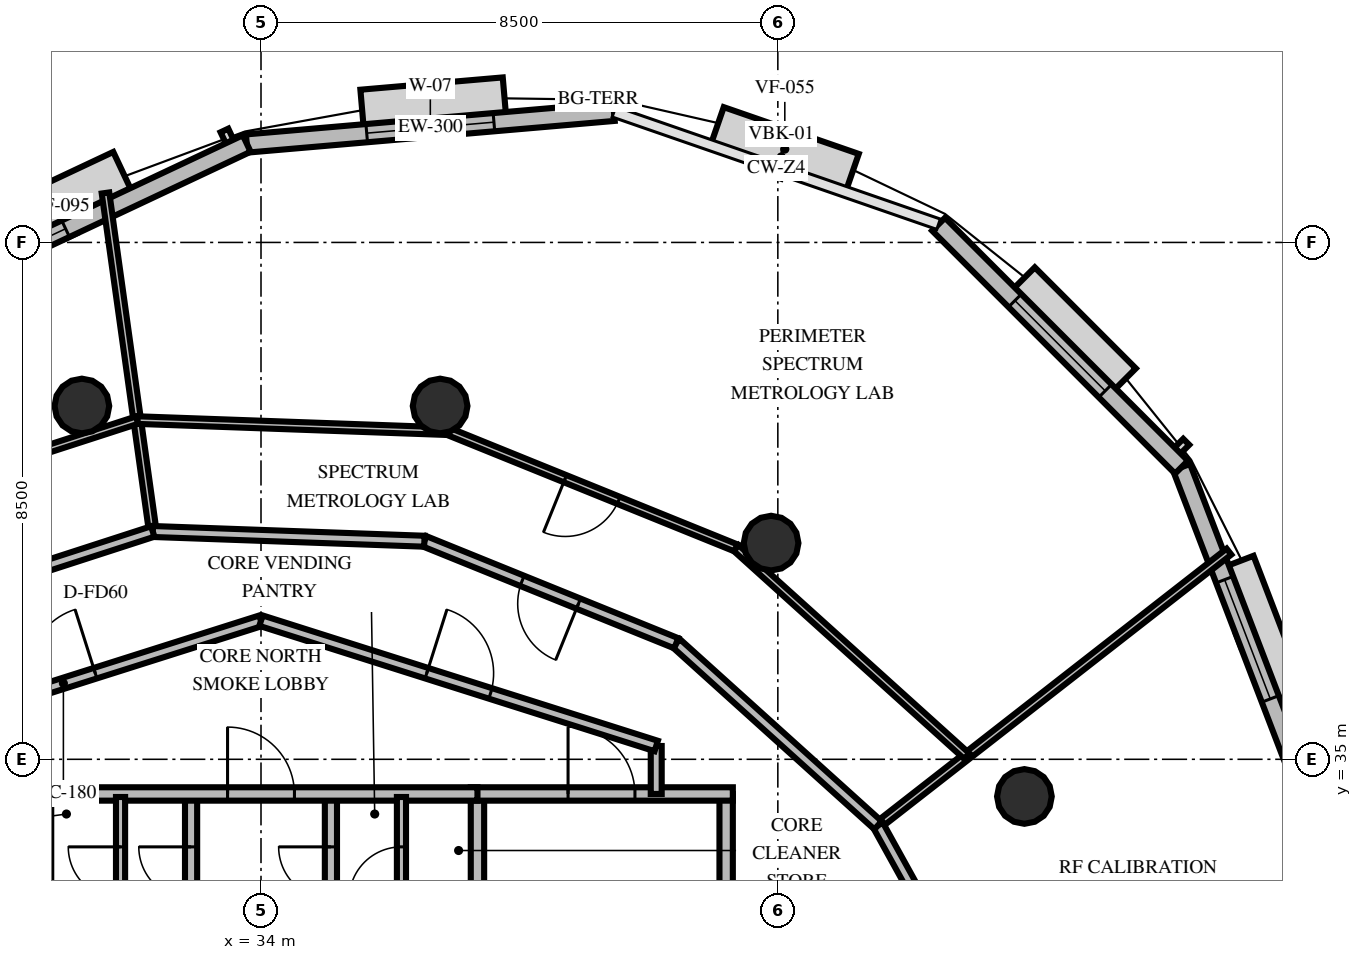
"""IFC4 building model, lengths in metres.
Left out: names, types, materials, properties, quantities, classifications, styles, units other than length and angle.
Written with IfcOpenShell. Run it as: python <this file> out.ifc"""

import sys

from ifc_helpers import new_model, si_unit, direction, frame, frame_2d, origin, origin_2d, place, context, subcontext, project, spatial, rectangle, circle, extrude, element, fill, save


model = new_model("IFC4")
c1 = context("Model", 3, precision=1e-05, world=origin(), true_north=direction((0.0, 1.0)))
c2 = subcontext(c1, "Body", "Model", "MODEL_VIEW")
j1 = project(units=[si_unit("LENGTHUNIT", "METRE"), si_unit("PLANEANGLEUNIT", "RADIAN")], contexts=[c1])
p1 = place(None, origin())
s1 = spatial("IfcSite", under=j1, at=p1, CompositionType="ELEMENT")
p2 = place(p1, origin())
s2 = spatial("IfcBuilding", under=s1, at=p2, CompositionType="ELEMENT")
p3 = place(p2, frame((0.0, 0.0, 270.0)))
s3 = spatial("IfcBuildingStorey", under=s2, at=p3, CompositionType="ELEMENT", Elevation=270.0)
for number, where, z_axis, x_axis in (
    (1, (46.555, 34.389, 0.0), (0.0, 0.0, 1.0), (1.0, 0.0, 0.0)),
    (2, (42.389, 38.555, 0.0), (0.0, 0.0, 1.0), (1.0, 0.0, 0.0)),
    (3, (36.946, 40.81, 0.0), (0.0, 0.0, 1.0), (1.0, 0.0, 0.0)),
    (4, (31.054, 40.81, 0.0), (0.0, 0.0, 1.0), (1.0, 0.0, 0.0)),
):
    element("IfcColumn", number, at=place(p3, frame(where, z_axis=z_axis, x_axis=x_axis)), inside=s3, PredefinedType="COLUMN", context=c2, shape_type="SweptSolid", body=[
        extrude(circle(Radius=0.45, at=origin_2d()), origin(), (0.0, 0.0, 1.0), 3.6),
    ])
p4 = place(p3, frame((39.804, 45.648, 0.0), z_axis=(0.0, 0.0, 1.0), x_axis=(-0.996296147919, -0.08598828782, 0.0)))
e5 = element("IfcWall", 5, at=p4, inside=s3, PredefinedType="SOLIDWALL", context=c2, shape_type="SweptSolid", body=[
    extrude(rectangle(XDim=6.062, YDim=0.3, at=frame_2d((3.031, 0.0))), origin(), (0.0, 0.0, 1.0), 2.76),
])
p5 = place(p4, frame((1.981, 0.0, 0.8)))
e6 = element("IfcOpeningElement", 6, at=p5, cuts=e5, PredefinedType="OPENING", context=c2, shape_type="SweptSolid", body=[
    extrude(rectangle(XDim=2.1, YDim=1.85, at=frame_2d((1.05, 0.925))), frame((0.0, 0.16, 0.0), z_axis=(0.0, -1.0, 0.0), x_axis=(1.0, 0.0, 0.0)), (0.0, 0.0, 1.0), 0.32),
])
p6 = place(p3, frame((33.765, 45.127, 0.0), z_axis=(0.0, 0.0, 1.0), x_axis=(-0.904858675558, -0.425712082595, 0.0)))
e7 = element("IfcWall", 7, at=p6, inside=s3, PredefinedType="SOLIDWALL", context=c2, shape_type="SweptSolid", body=[
    extrude(rectangle(XDim=6.643, YDim=0.3, at=frame_2d((3.322, 0.0))), origin(), (0.0, 0.0, 1.0), 2.76),
])
p7 = place(p6, frame((3.292, 0.0, 0.8)))
e8 = element("IfcOpeningElement", 8, at=p7, cuts=e7, PredefinedType="OPENING", context=c2, shape_type="SweptSolid", body=[
    extrude(rectangle(XDim=2.1, YDim=1.85, at=frame_2d((1.05, 0.925))), frame((0.0, 0.16, 0.0), z_axis=(0.0, -1.0, 0.0), x_axis=(1.0, 0.0, 0.0)), (0.0, 0.0, 1.0), 0.32),
])
p8 = place(p3, frame((51.308, 34.143, 0.0), z_axis=(0.0, 0.0, 1.0), x_axis=(-0.357845295603, 0.933780886726, 0.0)))
e9 = element("IfcWall", 9, at=p8, inside=s3, PredefinedType="SOLIDWALL", context=c2, shape_type="SweptSolid", body=[
    extrude(rectangle(XDim=6.062, YDim=0.3, at=frame_2d((3.031, 0.0))), origin(), (0.0, 0.0, 1.0), 2.76),
])
p9 = place(p8, frame((1.981, 0.0, 0.8)))
e10 = element("IfcOpeningElement", 10, at=p9, cuts=e9, PredefinedType="OPENING", context=c2, shape_type="SweptSolid", body=[
    extrude(rectangle(XDim=2.1, YDim=1.85, at=frame_2d((1.05, 0.925))), frame((0.0, 0.16, 0.0), z_axis=(0.0, -1.0, 0.0), x_axis=(1.0, 0.0, 0.0)), (0.0, 0.0, 1.0), 0.32),
])
p10 = place(p3, frame((49.139, 39.804, 0.0), z_axis=(0.0, 0.0, 1.0), x_axis=(-0.707063571386, 0.707149988347, 0.0)))
e11 = element("IfcWall", 11, at=p10, inside=s3, PredefinedType="SOLIDWALL", context=c2, shape_type="SweptSolid", body=[
    extrude(rectangle(XDim=5.65, YDim=0.3, at=frame_2d((2.825, 0.0))), origin(), (0.0, 0.0, 1.0), 2.76),
])
p11 = place(p10, frame((1.775, 0.0, 0.8)))
e12 = element("IfcOpeningElement", 12, at=p11, cuts=e11, PredefinedType="OPENING", context=c2, shape_type="SweptSolid", body=[
    extrude(rectangle(XDim=2.1, YDim=1.85, at=frame_2d((1.05, 0.925))), frame((0.0, 0.16, 0.0), z_axis=(0.0, -1.0, 0.0), x_axis=(1.0, 0.0, 0.0)), (0.0, 0.0, 1.0), 0.32),
])
p12 = place(p3, frame((32.85, 30.05, 0.0), z_axis=(0.0, 0.0, 1.0), x_axis=(0.0, 1.0, 0.0)))
e13 = element("IfcWall", 13, at=p12, inside=s3, PredefinedType="SOLIDWALL", context=c2, shape_type="SweptSolid", body=[
    extrude(rectangle(XDim=4.38, YDim=0.2, at=frame_2d((2.19, 0.0))), origin(), (0.0, 0.0, 1.0), 2.46),
])
p13 = place(p12, frame((2.65, 0.0, 0.0)))
e14 = element("IfcOpeningElement", 14, at=p13, cuts=e13, PredefinedType="OPENING", context=c2, shape_type="SweptSolid", body=[
    extrude(rectangle(XDim=0.86, YDim=2.05, at=frame_2d((0.43, 1.025))), frame((0.0, 0.11, 0.0), z_axis=(0.0, -1.0, 0.0), x_axis=(1.0, 0.0, 0.0)), (0.0, 0.0, 1.0), 0.22),
])
p14 = place(p3, frame((37.56, 30.05, 0.0), z_axis=(0.0, 0.0, 1.0), x_axis=(0.0, 1.0, 0.0)))
e15 = element("IfcWall", 15, at=p14, inside=s3, PredefinedType="SOLIDWALL", context=c2, shape_type="SweptSolid", body=[
    extrude(rectangle(XDim=4.38, YDim=0.22, at=frame_2d((2.19, 0.0))), origin(), (0.0, 0.0, 1.0), 2.46),
])
p15 = place(p14, frame((0.8, 0.0, 0.0)))
e16 = element("IfcOpeningElement", 16, at=p15, cuts=e15, PredefinedType="OPENING", context=c2, shape_type="SweptSolid", body=[
    extrude(rectangle(XDim=1.05, YDim=2.1, at=frame_2d((0.525, 1.05))), frame((0.0, 0.12, 0.0), z_axis=(0.0, -1.0, 0.0), x_axis=(1.0, 0.0, 0.0)), (0.0, 0.0, 1.0), 0.24),
])
p16 = place(p3, frame((41.65, 30.05, 0.0), z_axis=(0.0, 0.0, 1.0), x_axis=(0.0, 1.0, 0.0)))
e17 = element("IfcWall", 17, at=p16, inside=s3, PredefinedType="SOLIDWALL", context=c2, shape_type="SweptSolid", body=[
    extrude(rectangle(XDim=4.38, YDim=0.22, at=frame_2d((2.19, 0.0))), origin(), (0.0, 0.0, 1.0), 2.46),
])
p17 = place(p3, frame((37.45, 34.43, 0.0), z_axis=(0.0, 0.0, 1.0), x_axis=(1.0, 0.0, 0.0)))
e18 = element("IfcWall", 18, at=p17, inside=s3, PredefinedType="SOLIDWALL", context=c2, shape_type="SweptSolid", body=[
    extrude(rectangle(XDim=4.31, YDim=0.22, at=frame_2d((2.155, 0.0))), origin(), (0.0, 0.0, 1.0), 2.46),
])
p18 = place(p17, frame((1.6, 0.0, 0.0)))
e19 = element("IfcOpeningElement", 19, at=p18, cuts=e18, PredefinedType="OPENING", context=c2, shape_type="SweptSolid", body=[
    extrude(rectangle(XDim=1.1, YDim=2.15, at=frame_2d((0.55, 1.075))), frame((0.0, 0.12, 0.0), z_axis=(0.0, -1.0, 0.0), x_axis=(1.0, 0.0, 0.0)), (0.0, 0.0, 1.0), 0.24),
])
p19 = place(p3, frame((35.15, 30.05, 0.0), z_axis=(0.0, 0.0, 1.0), x_axis=(0.0, 1.0, 0.0)))
e20 = element("IfcWall", 20, at=p19, inside=s3, PredefinedType="SOLIDWALL", context=c2, shape_type="SweptSolid", body=[
    extrude(rectangle(XDim=4.38, YDim=0.2, at=frame_2d((2.19, 0.0))), origin(), (0.0, 0.0, 1.0), 2.46),
])
p20 = place(p19, frame((2.65, 0.0, 0.0)))
e21 = element("IfcOpeningElement", 21, at=p20, cuts=e20, PredefinedType="OPENING", context=c2, shape_type="SweptSolid", body=[
    extrude(rectangle(XDim=0.86, YDim=2.05, at=frame_2d((0.43, 1.025))), frame((0.0, 0.11, 0.0), z_axis=(0.0, -1.0, 0.0), x_axis=(1.0, 0.0, 0.0)), (0.0, 0.0, 1.0), 0.22),
])
p21 = place(p3, frame((30.44, 34.43, 0.0), z_axis=(0.0, 0.0, 1.0), x_axis=(1.0, 0.0, 0.0)))
e22 = element("IfcWall", 22, at=p21, inside=s3, PredefinedType="SOLIDWALL", context=c2, shape_type="SweptSolid", body=[
    extrude(rectangle(XDim=7.12, YDim=0.22, at=frame_2d((3.56, 0.0))), origin(), (0.0, 0.0, 1.0), 2.46),
])
p22 = place(p21, frame((3.01, 0.0, 0.0)))
e23 = element("IfcOpeningElement", 23, at=p22, cuts=e22, PredefinedType="OPENING", context=c2, shape_type="SweptSolid", body=[
    extrude(rectangle(XDim=1.1, YDim=2.15, at=frame_2d((0.55, 1.075))), frame((0.0, 0.12, 0.0), z_axis=(0.0, -1.0, 0.0), x_axis=(1.0, 0.0, 0.0)), (0.0, 0.0, 1.0), 0.24),
])
p23 = place(p3, frame((31.69, 32.05, 0.0), z_axis=(0.0, 0.0, 1.0), x_axis=(0.0, 1.0, 0.0)))
e24 = element("IfcWall", 24, at=p23, inside=s3, PredefinedType="PARTITIONING", context=c2, shape_type="SweptSolid", body=[
    extrude(rectangle(XDim=2.33, YDim=0.15, at=frame_2d((1.165, 0.0))), origin(), (0.0, 0.0, 1.0), 2.46),
])
p24 = place(p23, frame((0.65, 0.0, 0.0)))
e25 = element("IfcOpeningElement", 25, at=p24, cuts=e24, PredefinedType="OPENING", context=c2, shape_type="SweptSolid", body=[
    extrude(rectangle(XDim=0.86, YDim=2.05, at=frame_2d((0.43, 1.025))), frame((0.0, 0.085, 0.0), z_axis=(0.0, -1.0, 0.0), x_axis=(1.0, 0.0, 0.0)), (0.0, 0.0, 1.0), 0.17),
])
p25 = place(p3, frame((36.31, 32.05, 0.0), z_axis=(0.0, 0.0, 1.0), x_axis=(0.0, 1.0, 0.0)))
e26 = element("IfcWall", 26, at=p25, inside=s3, PredefinedType="PARTITIONING", context=c2, shape_type="SweptSolid", body=[
    extrude(rectangle(XDim=2.33, YDim=0.15, at=frame_2d((1.165, 0.0))), origin(), (0.0, 0.0, 1.0), 2.46),
])
p26 = place(p25, frame((0.65, 0.0, 0.0)))
e27 = element("IfcOpeningElement", 27, at=p26, cuts=e26, PredefinedType="OPENING", context=c2, shape_type="SweptSolid", body=[
    extrude(rectangle(XDim=0.86, YDim=2.05, at=frame_2d((0.43, 1.025))), frame((0.0, 0.085, 0.0), z_axis=(0.0, -1.0, 0.0), x_axis=(1.0, 0.0, 0.0)), (0.0, 0.0, 1.0), 0.17),
])
p27 = place(p3, frame((40.5, 35.219, 0.0), z_axis=(0.0, 0.0, 1.0), x_axis=(0.0, -1.0, 0.0)))
e28 = element("IfcWall", 28, at=p27, inside=s3, PredefinedType="PARTITIONING", context=c2, shape_type="SweptSolid", body=[
    extrude(rectangle(XDim=0.789, YDim=0.18, at=frame_2d((0.395, 0.0))), origin(), (0.0, 0.0, 1.0), 2.46),
])
p28 = place(p3, frame((27.5, 35.219, 0.0), z_axis=(0.0, 0.0, 1.0), x_axis=(0.953228121756, 0.302251795518, 0.0)))
e29 = element("IfcWall", 29, at=p28, inside=s3, PredefinedType="PARTITIONING", context=c2, shape_type="SweptSolid", body=[
    extrude(rectangle(XDim=6.819, YDim=0.18, at=frame_2d((3.409, 0.0))), origin(), (0.0, 0.0, 1.0), 2.46),
])
p29 = place(p28, frame((2.86, 0.0, 0.0)))
e30 = element("IfcOpeningElement", 30, at=p29, cuts=e29, PredefinedType="OPENING", context=c2, shape_type="SweptSolid", body=[
    extrude(rectangle(XDim=1.1, YDim=2.15, at=frame_2d((0.55, 1.075))), frame((0.0, 0.1, 0.0), z_axis=(0.0, -1.0, 0.0), x_axis=(1.0, 0.0, 0.0)), (0.0, 0.0, 1.0), 0.2),
])
p30 = place(p3, frame((34.0, 37.28, 0.0), z_axis=(0.0, 0.0, 1.0), x_axis=(0.953228121756, -0.302251795518, 0.0)))
e31 = element("IfcWall", 31, at=p30, inside=s3, PredefinedType="PARTITIONING", context=c2, shape_type="SweptSolid", body=[
    extrude(rectangle(XDim=6.819, YDim=0.18, at=frame_2d((3.409, 0.0))), origin(), (0.0, 0.0, 1.0), 2.46),
])
p31 = place(p30, frame((2.86, 0.0, 0.0)))
e32 = element("IfcOpeningElement", 32, at=p31, cuts=e31, PredefinedType="OPENING", context=c2, shape_type="SweptSolid", body=[
    extrude(rectangle(XDim=1.1, YDim=2.15, at=frame_2d((0.55, 1.075))), frame((0.0, 0.1, 0.0), z_axis=(0.0, -1.0, 0.0), x_axis=(1.0, 0.0, 0.0)), (0.0, 0.0, 1.0), 0.2),
])
p32 = place(p3, frame((44.149, 33.915, 0.0), z_axis=(0.0, 0.0, 1.0), x_axis=(0.788548574124, 0.614972476008, 0.0)))
e33 = element("IfcWall", 33, at=p32, inside=s3, PredefinedType="PARTITIONING", context=c2, shape_type="SweptSolid", body=[
    extrude(rectangle(XDim=7.318, YDim=0.125, at=frame_2d((3.659, 0.0))), origin(), (0.0, 0.0, 1.0), 2.46),
])
p33 = place(p3, frame((46.098, 30.391, 0.0), z_axis=(0.0, 0.0, 1.0), x_axis=(-0.484005083868, 0.875065185452, 0.0)))
e34 = element("IfcWall", 34, at=p33, inside=s3, PredefinedType="PARTITIONING", context=c2, shape_type="SweptSolid", body=[
    extrude(rectangle(XDim=4.027, YDim=0.18, at=frame_2d((2.013, 0.0))), origin(), (0.0, 0.0, 1.0), 2.46),
])
p34 = place(p33, frame((0.832, 0.0, 0.0)))
e35 = element("IfcOpeningElement", 35, at=p34, cuts=e34, PredefinedType="OPENING", context=c2, shape_type="SweptSolid", body=[
    extrude(rectangle(XDim=1.0, YDim=2.15, at=frame_2d((0.5, 1.075))), frame((0.0, 0.1, 0.0), z_axis=(0.0, -1.0, 0.0), x_axis=(1.0, 0.0, 0.0)), (0.0, 0.0, 1.0), 0.2),
])
p35 = place(p3, frame((32.22, 38.746, 0.0), z_axis=(0.0, 0.0, 1.0), x_axis=(-0.138331765083, 0.990385946371, 0.0)))
e36 = element("IfcWall", 36, at=p35, inside=s3, PredefinedType="PARTITIONING", context=c2, shape_type="SweptSolid", body=[
    extrude(rectangle(XDim=5.621, YDim=0.125, at=frame_2d((2.811, 0.0))), origin(), (0.0, 0.0, 1.0), 2.46),
])
p36 = place(p3, frame((44.149, 33.915, 0.0), z_axis=(0.0, 0.0, 1.0), x_axis=(-0.742573984857, 0.669764045775, 0.0)))
e37 = element("IfcWall", 37, at=p36, inside=s3, PredefinedType="PARTITIONING", context=c2, shape_type="SweptSolid", body=[
    extrude(rectangle(XDim=4.47, YDim=0.18, at=frame_2d((2.235, 0.0))), origin(), (0.0, 0.0, 1.0), 2.46),
])
p37 = place(p3, frame((40.83, 36.908, 0.0), z_axis=(0.0, 0.0, 1.0), x_axis=(-0.926859496036, 0.375408410411, 0.0)))
e38 = element("IfcWall", 38, at=p37, inside=s3, PredefinedType="PARTITIONING", context=c2, shape_type="SweptSolid", body=[
    extrude(rectangle(XDim=4.47, YDim=0.18, at=frame_2d((2.235, 0.0))), origin(), (0.0, 0.0, 1.0), 2.46),
])
p38 = place(p37, frame((1.735, 0.0, 0.0)))
e39 = element("IfcOpeningElement", 39, at=p38, cuts=e38, PredefinedType="OPENING", context=c2, shape_type="SweptSolid", body=[
    extrude(rectangle(XDim=1.0, YDim=2.15, at=frame_2d((0.5, 1.075))), frame((0.0, 0.1, 0.0), z_axis=(0.0, -1.0, 0.0), x_axis=(1.0, 0.0, 0.0)), (0.0, 0.0, 1.0), 0.2),
])
p39 = place(p3, frame((36.687, 38.586, 0.0), z_axis=(0.0, 0.0, 1.0), x_axis=(-0.999359789069, 0.035777255238, 0.0)))
e40 = element("IfcWall", 40, at=p39, inside=s3, PredefinedType="PARTITIONING", context=c2, shape_type="SweptSolid", body=[
    extrude(rectangle(XDim=4.47, YDim=0.18, at=frame_2d((2.235, 0.0))), origin(), (0.0, 0.0, 1.0), 2.46),
])
p40 = place(p3, frame((45.607, 35.052, 0.0), z_axis=(0.0, 0.0, 1.0), x_axis=(-0.742559943457, 0.669779613286, 0.0)))
e41 = element("IfcWall", 41, at=p40, inside=s3, PredefinedType="PARTITIONING", context=c2, shape_type="SweptSolid", body=[
    extrude(rectangle(XDim=5.112, YDim=0.125, at=frame_2d((2.556, 0.0))), origin(), (0.0, 0.0, 1.0), 2.46),
])
p41 = place(p3, frame((41.811, 38.477, 0.0), z_axis=(0.0, 0.0, 1.0), x_axis=(-0.926857415115, 0.375413548033, 0.0)))
e42 = element("IfcWall", 42, at=p41, inside=s3, PredefinedType="PARTITIONING", context=c2, shape_type="SweptSolid", body=[
    extrude(rectangle(XDim=5.112, YDim=0.125, at=frame_2d((2.556, 0.0))), origin(), (0.0, 0.0, 1.0), 2.46),
])
p42 = place(p41, frame((2.081, 0.0, 0.0)))
e43 = element("IfcOpeningElement", 43, at=p42, cuts=e42, PredefinedType="OPENING", context=c2, shape_type="SweptSolid", body=[
    extrude(rectangle(XDim=0.95, YDim=2.15, at=frame_2d((0.475, 1.075))), frame((0.0, 0.073, 0.0), z_axis=(0.0, -1.0, 0.0), x_axis=(1.0, 0.0, 0.0)), (0.0, 0.0, 1.0), 0.145),
])
p43 = place(p3, frame((37.073, 40.396, 0.0), z_axis=(0.0, 0.0, 1.0), x_axis=(-0.999360052784, 0.035769888155, 0.0)))
e44 = element("IfcWall", 44, at=p43, inside=s3, PredefinedType="PARTITIONING", context=c2, shape_type="SweptSolid", body=[
    extrude(rectangle(XDim=5.112, YDim=0.125, at=frame_2d((2.556, 0.0))), origin(), (0.0, 0.0, 1.0), 2.46),
])
p44 = place(p3, frame((32.22, 38.746, 0.0), z_axis=(0.0, 0.0, 1.0), x_axis=(-0.951331063375, -0.30817074465, 0.0)))
e45 = element("IfcWall", 45, at=p44, inside=s3, PredefinedType="PARTITIONING", context=c2, shape_type="SweptSolid", body=[
    extrude(rectangle(XDim=4.47, YDim=0.18, at=frame_2d((2.235, 0.0))), origin(), (0.0, 0.0, 1.0), 2.46),
])
p45 = place(p44, frame((2.527, 0.0, 0.0)))
e46 = element("IfcOpeningElement", 46, at=p45, cuts=e45, PredefinedType="OPENING", context=c2, shape_type="SweptSolid", body=[
    extrude(rectangle(XDim=1.0, YDim=2.15, at=frame_2d((0.5, 1.075))), frame((0.0, 0.1, 0.0), z_axis=(0.0, -1.0, 0.0), x_axis=(1.0, 0.0, 0.0)), (0.0, 0.0, 1.0), 0.2),
])
p46 = place(p3, frame((31.964, 40.579, 0.0), z_axis=(0.0, 0.0, 1.0), x_axis=(-0.95131897624, -0.308208055452, 0.0)))
e47 = element("IfcWall", 47, at=p46, inside=s3, PredefinedType="PARTITIONING", context=c2, shape_type="SweptSolid", body=[
    extrude(rectangle(XDim=5.112, YDim=0.125, at=frame_2d((2.556, 0.0))), origin(), (0.0, 0.0, 1.0), 2.46),
])
p47 = place(p46, frame((3.032, 0.0, 0.0)))
e48 = element("IfcOpeningElement", 48, at=p47, cuts=e47, PredefinedType="OPENING", context=c2, shape_type="SweptSolid", body=[
    extrude(rectangle(XDim=0.95, YDim=2.15, at=frame_2d((0.475, 1.075))), frame((0.0, 0.073, 0.0), z_axis=(0.0, -1.0, 0.0), x_axis=(1.0, 0.0, 0.0)), (0.0, 0.0, 1.0), 0.145),
])
p48 = place(p5, origin())
e49 = element("IfcWindow", 49, at=p48, inside=s3, PartitioningType="SINGLE_PANEL", PredefinedType="WINDOW", context=c2, shape_type="SweptSolid", body=[
    extrude(rectangle(XDim=2.1, YDim=1.85, at=frame_2d((1.05, 0.925))), frame((0.0, 0.03, 0.0), z_axis=(0.0, -1.0, 0.0), x_axis=(1.0, 0.0, 0.0)), (0.0, 0.0, 1.0), 0.06),
])
fill(e6, e49)
p49 = place(p7, origin())
e50 = element("IfcWindow", 50, at=p49, inside=s3, PartitioningType="SINGLE_PANEL", PredefinedType="WINDOW", context=c2, shape_type="SweptSolid", body=[
    extrude(rectangle(XDim=2.1, YDim=1.85, at=frame_2d((1.05, 0.925))), frame((0.0, 0.03, 0.0), z_axis=(0.0, -1.0, 0.0), x_axis=(1.0, 0.0, 0.0)), (0.0, 0.0, 1.0), 0.06),
])
fill(e8, e50)
p50 = place(p9, origin())
e51 = element("IfcWindow", 51, at=p50, inside=s3, PartitioningType="SINGLE_PANEL", PredefinedType="WINDOW", context=c2, shape_type="SweptSolid", body=[
    extrude(rectangle(XDim=2.1, YDim=1.85, at=frame_2d((1.05, 0.925))), frame((0.0, 0.03, 0.0), z_axis=(0.0, -1.0, 0.0), x_axis=(1.0, 0.0, 0.0)), (0.0, 0.0, 1.0), 0.06),
])
fill(e10, e51)
p51 = place(p11, origin())
e52 = element("IfcWindow", 52, at=p51, inside=s3, PartitioningType="SINGLE_PANEL", PredefinedType="WINDOW", context=c2, shape_type="SweptSolid", body=[
    extrude(rectangle(XDim=2.1, YDim=1.85, at=frame_2d((1.05, 0.925))), frame((0.0, 0.03, 0.0), z_axis=(0.0, -1.0, 0.0), x_axis=(1.0, 0.0, 0.0)), (0.0, 0.0, 1.0), 0.06),
])
fill(e12, e52)
p52 = place(p13, origin())
e53 = element("IfcDoor", 53, at=p52, inside=s3, OperationType="SINGLE_SWING_RIGHT", PredefinedType="TRAPDOOR", context=c2, shape_type="SweptSolid", body=[
    extrude(rectangle(XDim=0.86, YDim=2.05, at=frame_2d((0.43, 1.025))), frame((0.0, 0.025, 0.0), z_axis=(0.0, -1.0, 0.0), x_axis=(1.0, 0.0, 0.0)), (0.0, 0.0, 1.0), 0.05),
])
fill(e14, e53)
p53 = place(p18, origin())
e54 = element("IfcDoor", 54, at=p53, inside=s3, OperationType="SINGLE_SWING_LEFT", PredefinedType="DOOR", context=c2, shape_type="SweptSolid", body=[
    extrude(rectangle(XDim=1.1, YDim=2.15, at=frame_2d((0.55, 1.075))), frame((0.0, 0.025, 0.0), z_axis=(0.0, -1.0, 0.0), x_axis=(1.0, 0.0, 0.0)), (0.0, 0.0, 1.0), 0.05),
])
fill(e19, e54)
p54 = place(p20, origin())
e55 = element("IfcDoor", 55, at=p54, inside=s3, OperationType="SINGLE_SWING_RIGHT", PredefinedType="TRAPDOOR", context=c2, shape_type="SweptSolid", body=[
    extrude(rectangle(XDim=0.86, YDim=2.05, at=frame_2d((0.43, 1.025))), frame((0.0, 0.025, 0.0), z_axis=(0.0, -1.0, 0.0), x_axis=(1.0, 0.0, 0.0)), (0.0, 0.0, 1.0), 0.05),
])
fill(e21, e55)
p55 = place(p22, origin())
e56 = element("IfcDoor", 56, at=p55, inside=s3, OperationType="SINGLE_SWING_LEFT", PredefinedType="DOOR", context=c2, shape_type="SweptSolid", body=[
    extrude(rectangle(XDim=1.1, YDim=2.15, at=frame_2d((0.55, 1.075))), frame((0.0, 0.025, 0.0), z_axis=(0.0, -1.0, 0.0), x_axis=(1.0, 0.0, 0.0)), (0.0, 0.0, 1.0), 0.05),
])
fill(e23, e56)
p56 = place(p24, origin())
e57 = element("IfcDoor", 57, at=p56, inside=s3, OperationType="SINGLE_SWING_RIGHT", PredefinedType="TRAPDOOR", context=c2, shape_type="SweptSolid", body=[
    extrude(rectangle(XDim=0.86, YDim=2.05, at=frame_2d((0.43, 1.025))), frame((0.0, 0.025, 0.0), z_axis=(0.0, -1.0, 0.0), x_axis=(1.0, 0.0, 0.0)), (0.0, 0.0, 1.0), 0.05),
])
fill(e25, e57)
p57 = place(p26, origin())
e58 = element("IfcDoor", 58, at=p57, inside=s3, OperationType="SINGLE_SWING_LEFT", PredefinedType="TRAPDOOR", context=c2, shape_type="SweptSolid", body=[
    extrude(rectangle(XDim=0.86, YDim=2.05, at=frame_2d((0.43, 1.025))), frame((0.0, 0.025, 0.0), z_axis=(0.0, -1.0, 0.0), x_axis=(1.0, 0.0, 0.0)), (0.0, 0.0, 1.0), 0.05),
])
fill(e27, e58)
p58 = place(p29, origin())
e59 = element("IfcDoor", 59, at=p58, inside=s3, OperationType="SINGLE_SWING_RIGHT", PredefinedType="DOOR", context=c2, shape_type="SweptSolid", body=[
    extrude(rectangle(XDim=1.1, YDim=2.15, at=frame_2d((0.55, 1.075))), frame((0.0, 0.025, 0.0), z_axis=(0.0, -1.0, 0.0), x_axis=(1.0, 0.0, 0.0)), (0.0, 0.0, 1.0), 0.05),
])
fill(e30, e59)
p59 = place(p31, origin())
e60 = element("IfcDoor", 60, at=p59, inside=s3, OperationType="SINGLE_SWING_LEFT", PredefinedType="DOOR", context=c2, shape_type="SweptSolid", body=[
    extrude(rectangle(XDim=1.1, YDim=2.15, at=frame_2d((0.55, 1.075))), frame((0.0, 0.025, 0.0), z_axis=(0.0, -1.0, 0.0), x_axis=(1.0, 0.0, 0.0)), (0.0, 0.0, 1.0), 0.05),
])
fill(e32, e60)
p60 = place(p38, origin())
e61 = element("IfcDoor", 61, at=p60, inside=s3, OperationType="SINGLE_SWING_LEFT", PredefinedType="DOOR", context=c2, shape_type="SweptSolid", body=[
    extrude(rectangle(XDim=1.0, YDim=2.15, at=frame_2d((0.5, 1.075))), frame((0.0, 0.025, 0.0), z_axis=(0.0, -1.0, 0.0), x_axis=(1.0, 0.0, 0.0)), (0.0, 0.0, 1.0), 0.05),
])
fill(e39, e61)
p61 = place(p42, origin())
e62 = element("IfcDoor", 62, at=p61, inside=s3, OperationType="SINGLE_SWING_RIGHT", PredefinedType="DOOR", context=c2, shape_type="SweptSolid", body=[
    extrude(rectangle(XDim=0.95, YDim=2.15, at=frame_2d((0.475, 1.075))), frame((0.0, 0.025, 0.0), z_axis=(0.0, -1.0, 0.0), x_axis=(1.0, 0.0, 0.0)), (0.0, 0.0, 1.0), 0.05),
])
fill(e43, e62)
save(model, sys.argv[1])
